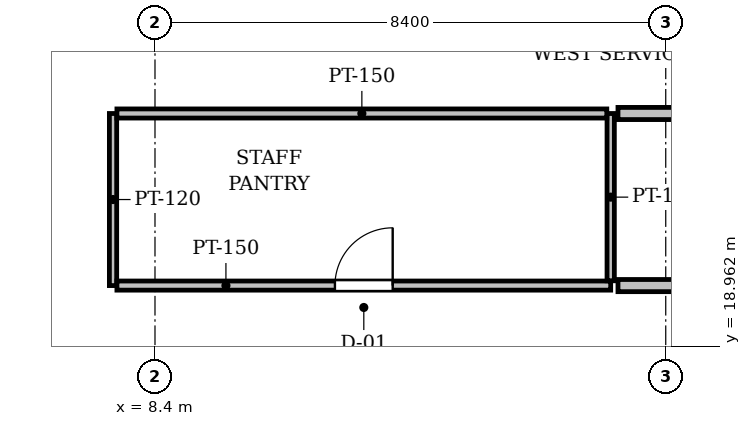
"""IFC4 building model, lengths in metres.
Left out: names, types, materials, properties, quantities, classifications, styles, units other than length and angle.
Written with IfcOpenShell. Run it as: python <this file> out.ifc"""

import sys

from ifc_helpers import new_model, si_unit, direction, frame, frame_2d, origin, place, context, subcontext, project, spatial, rectangle, extrude, element, fill, save


model = new_model("IFC4")
c1 = context("Model", 3, precision=1e-05, world=origin(), true_north=direction((0.0, 1.0)))
c2 = subcontext(c1, "Body", "Model", "MODEL_VIEW")
j1 = project(units=[si_unit("LENGTHUNIT", "METRE"), si_unit("PLANEANGLEUNIT", "RADIAN")], contexts=[c1])
p1 = place(None, origin())
s1 = spatial("IfcSite", under=j1, at=p1, CompositionType="ELEMENT")
p2 = place(p1, origin())
s2 = spatial("IfcBuilding", under=s1, at=p2, CompositionType="ELEMENT")
p3 = place(p2, frame((0.0, 0.0, 224.7)))
s3 = spatial("IfcBuildingStorey", under=s2, at=p3, CompositionType="ELEMENT", Elevation=224.7)
p4 = place(p3, frame((7.71, 22.79, 0.0), z_axis=(0.0, 0.0, 1.0), x_axis=(0.0, -1.0, 0.0)))
e1 = element("IfcWall", 1, at=p4, inside=s3, PredefinedType="PARTITIONING", context=c2, shape_type="SweptSolid", body=[
    extrude(rectangle(XDim=2.83, YDim=0.12, at=frame_2d((1.415, 0.0))), origin(), (0.0, 0.0, 1.0), 3.825),
])
p5 = place(p3, frame((7.774, 19.96, 0.0), z_axis=(0.0, 0.0, 1.0), x_axis=(1.0, 0.0, 0.0)))
e2 = element("IfcWall", 2, at=p5, inside=s3, PredefinedType="PARTITIONING", context=c2, shape_type="SweptSolid", body=[
    extrude(rectangle(XDim=8.121, YDim=0.15, at=frame_2d((4.06, 0.0))), origin(), (0.0, 0.0, 1.0), 3.371),
])
p6 = place(p5, frame((3.585, 0.0, 0.0)))
e3 = element("IfcOpeningElement", 3, at=p6, cuts=e2, PredefinedType="OPENING", context=c2, shape_type="SweptSolid", body=[
    extrude(rectangle(XDim=0.95, YDim=2.15, at=frame_2d((0.475, 1.075))), frame((0.0, 0.085, 0.0), z_axis=(0.0, -1.0, 0.0), x_axis=(1.0, 0.0, 0.0)), (0.0, 0.0, 1.0), 0.17),
])
p7 = place(p3, frame((15.895, 20.039, 0.0), z_axis=(0.0, 0.0, 1.0), x_axis=(0.0, 1.0, 0.0)))
e4 = element("IfcWall", 4, at=p7, inside=s3, PredefinedType="PARTITIONING", context=c2, shape_type="SweptSolid", body=[
    extrude(rectangle(XDim=2.751, YDim=0.12, at=frame_2d((1.375, 0.0))), origin(), (0.0, 0.0, 1.0), 3.825),
])
p8 = place(p3, frame((15.831, 22.79, 0.0), z_axis=(0.0, 0.0, 1.0), x_axis=(-1.0, 0.0, 0.0)))
e5 = element("IfcWall", 5, at=p8, inside=s3, PredefinedType="PARTITIONING", context=c2, shape_type="SweptSolid", body=[
    extrude(rectangle(XDim=8.057, YDim=0.15, at=frame_2d((4.028, 0.0))), origin(), (0.0, 0.0, 1.0), 3.371),
])
p9 = place(p3, frame((19.9, 22.79, 0.0), z_axis=(0.0, 0.0, 1.0), x_axis=(-1.0, 0.0, 0.0)))
e6 = element("IfcWall", 6, at=p9, inside=s3, PredefinedType="PARTITIONING", context=c2, shape_type="SweptSolid", body=[
    extrude(rectangle(XDim=3.885, YDim=0.2, at=frame_2d((1.943, 0.0))), origin(), (0.0, 0.0, 1.0), 3.371),
])
p10 = place(p3, frame((16.015, 19.96, 0.0), z_axis=(0.0, 0.0, 1.0), x_axis=(1.0, 0.0, 0.0)))
e7 = element("IfcWall", 7, at=p10, inside=s3, PredefinedType="PARTITIONING", context=c2, shape_type="SweptSolid", body=[
    extrude(rectangle(XDim=20.635, YDim=0.2, at=frame_2d((10.318, 0.0))), origin(), (0.0, 0.0, 1.0), 3.371),
])
p11 = place(p10, frame((9.818, 0.0, 0.0)))
e8 = element("IfcOpeningElement", 8, at=p11, cuts=e7, PredefinedType="OPENING", context=c2, shape_type="SweptSolid", body=[
    extrude(rectangle(XDim=1.0, YDim=2.15, at=frame_2d((0.5, 1.075))), frame((0.0, 0.11, 0.0), z_axis=(0.0, -1.0, 0.0), x_axis=(1.0, 0.0, 0.0)), (0.0, 0.0, 1.0), 0.22),
])
p12 = place(p6, origin())
e9 = element("IfcDoor", 9, at=p12, inside=s3, OperationType="SINGLE_SWING_RIGHT", PredefinedType="DOOR", context=c2, shape_type="SweptSolid", body=[
    extrude(rectangle(XDim=0.95, YDim=2.15, at=frame_2d((0.475, 1.075))), frame((0.0, 0.025, 0.0), z_axis=(0.0, -1.0, 0.0), x_axis=(1.0, 0.0, 0.0)), (0.0, 0.0, 1.0), 0.05),
])
fill(e3, e9)
save(model, sys.argv[1])
